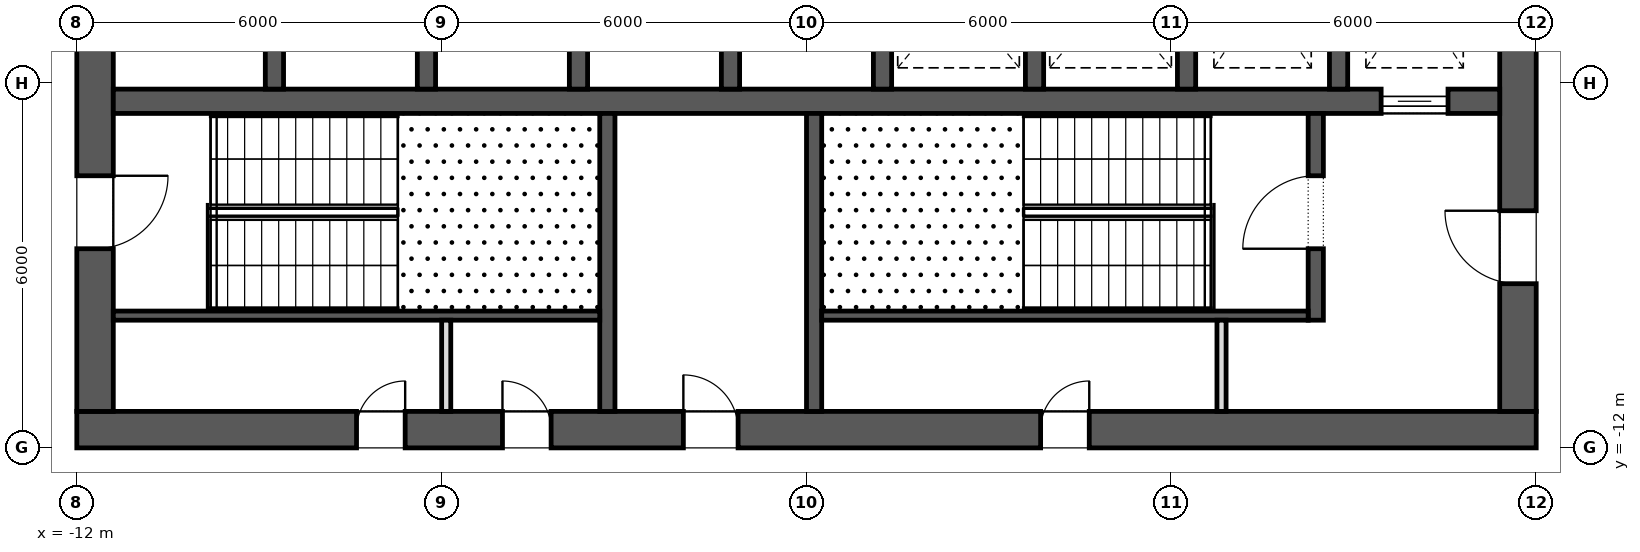
"""IFC4 building model, lengths in metres.
Left out: names, types, materials, properties, quantities, classifications, styles, units other than length and angle.
Written with IfcOpenShell. Run it as: python <this file> out.ifc"""

import sys

from ifc_helpers import new_model, si_unit, direction, frame, frame_2d, origin, place, context, subcontext, project, spatial, rectangle, extrude, element, fill, save


model = new_model("IFC4")
c1 = context("Model", 3, precision=1e-05, world=origin(), true_north=direction((0.0, 1.0)))
c2 = subcontext(c1, "Body", "Model", "MODEL_VIEW")
j1 = project(units=[si_unit("LENGTHUNIT", "METRE"), si_unit("PLANEANGLEUNIT", "RADIAN")], contexts=[c1])
p1 = place(None, origin())
s1 = spatial("IfcSite", under=j1, at=p1, CompositionType="ELEMENT")
p2 = place(p1, origin())
s2 = spatial("IfcBuilding", under=s1, at=p2, CompositionType="ELEMENT")
p3 = place(p2, frame((0.0, 0.0, 154.9)))
s3 = spatial("IfcBuildingStorey", under=s2, at=p3, CompositionType="ELEMENT", Elevation=154.9)
p4 = place(p3, frame((-12.0, -11.7, 0.0), z_axis=(0.0, 0.0, 1.0), x_axis=(1.0, 0.0, 0.0)))
e1 = element("IfcWall", 1, at=p4, inside=s3, PredefinedType="SHEAR", context=c2, shape_type="SweptSolid", body=[
    extrude(rectangle(XDim=24.0, YDim=0.6, at=frame_2d((12.0, 0.0))), origin(), (0.0, 0.0, 1.0), 4.2),
])
p5 = place(p4, frame((9.975, 0.0, 0.0)))
e2 = element("IfcOpeningElement", 2, at=p5, cuts=e1, PredefinedType="OPENING", context=c2, shape_type="SweptSolid", body=[
    extrude(rectangle(XDim=0.9, YDim=2.1, at=frame_2d((0.45, 1.05))), frame((0.0, 0.312, 0.0), z_axis=(0.0, -1.0, 0.0), x_axis=(1.0, 0.0, 0.0)), (0.0, 0.0, 1.0), 0.624),
])
p6 = place(p4, frame((4.6, 0.0, 0.0)))
e3 = element("IfcOpeningElement", 3, at=p6, cuts=e1, PredefinedType="OPENING", context=c2, shape_type="SweptSolid", body=[
    extrude(rectangle(XDim=0.8, YDim=2.1, at=frame_2d((0.4, 1.05))), frame((0.0, 0.312, 0.0), z_axis=(0.0, -1.0, 0.0), x_axis=(1.0, 0.0, 0.0)), (0.0, 0.0, 1.0), 0.624),
])
p7 = place(p4, frame((7.0, 0.0, 0.0)))
e4 = element("IfcOpeningElement", 4, at=p7, cuts=e1, PredefinedType="OPENING", context=c2, shape_type="SweptSolid", body=[
    extrude(rectangle(XDim=0.8, YDim=2.1, at=frame_2d((0.4, 1.05))), frame((0.0, 0.312, 0.0), z_axis=(0.0, -1.0, 0.0), x_axis=(1.0, 0.0, 0.0)), (0.0, 0.0, 1.0), 0.624),
])
p8 = place(p4, frame((15.85, 0.0, 0.0)))
e5 = element("IfcOpeningElement", 5, at=p8, cuts=e1, PredefinedType="OPENING", context=c2, shape_type="SweptSolid", body=[
    extrude(rectangle(XDim=0.8, YDim=2.1, at=frame_2d((0.4, 1.05))), frame((0.0, 0.312, 0.0), z_axis=(0.0, -1.0, 0.0), x_axis=(1.0, 0.0, 0.0)), (0.0, 0.0, 1.0), 0.624),
])
p9 = place(p3, frame((11.7, -11.4, 0.0), z_axis=(0.0, 0.0, 1.0), x_axis=(0.0, 1.0, 0.0)))
e6 = element("IfcWall", 6, at=p9, inside=s3, PredefinedType="SHEAR", context=c2, shape_type="SweptSolid", body=[
    extrude(rectangle(XDim=22.8, YDim=0.6, at=frame_2d((11.4, 0.0))), origin(), (0.0, 0.0, 1.0), 4.2),
])
p10 = place(p9, frame((10.2, 0.0, 0.0)))
e7 = element("IfcOpeningElement", 7, at=p10, cuts=e6, PredefinedType="OPENING", context=c2, shape_type="SweptSolid", body=[
    extrude(rectangle(XDim=2.4, YDim=2.1, at=frame_2d((1.2, 1.05))), frame((0.0, 0.312, 0.0), z_axis=(0.0, -1.0, 0.0), x_axis=(1.0, 0.0, 0.0)), (0.0, 0.0, 1.0), 0.624),
])
p11 = place(p9, frame((19.5, 0.0, 0.0)))
e8 = element("IfcOpeningElement", 8, at=p11, cuts=e6, PredefinedType="OPENING", context=c2, shape_type="SweptSolid", body=[
    extrude(rectangle(XDim=1.2, YDim=2.1, at=frame_2d((0.6, 1.05))), frame((0.0, 0.312, 0.0), z_axis=(0.0, -1.0, 0.0), x_axis=(1.0, 0.0, 0.0)), (0.0, 0.0, 1.0), 0.624),
])
p12 = place(p9, frame((2.1, 0.0, 0.0)))
e9 = element("IfcOpeningElement", 9, at=p12, cuts=e6, PredefinedType="OPENING", context=c2, shape_type="SweptSolid", body=[
    extrude(rectangle(XDim=1.2, YDim=2.1, at=frame_2d((0.6, 1.05))), frame((0.0, 0.312, 0.0), z_axis=(0.0, -1.0, 0.0), x_axis=(1.0, 0.0, 0.0)), (0.0, 0.0, 1.0), 0.624),
])
p13 = place(p3, frame((-11.7, -11.4, 0.0), z_axis=(0.0, 0.0, 1.0), x_axis=(0.0, 1.0, 0.0)))
e10 = element("IfcWall", 10, at=p13, inside=s3, PredefinedType="SHEAR", context=c2, shape_type="SweptSolid", body=[
    extrude(rectangle(XDim=22.8, YDim=0.6, at=frame_2d((11.4, 0.0))), origin(), (0.0, 0.0, 1.0), 4.2),
])
p14 = place(p13, frame((10.2, 0.0, 0.0)))
e11 = element("IfcOpeningElement", 11, at=p14, cuts=e10, PredefinedType="OPENING", context=c2, shape_type="SweptSolid", body=[
    extrude(rectangle(XDim=2.4, YDim=2.1, at=frame_2d((1.2, 1.05))), frame((0.0, 0.312, 0.0), z_axis=(0.0, -1.0, 0.0), x_axis=(1.0, 0.0, 0.0)), (0.0, 0.0, 1.0), 0.624),
])
p15 = place(p13, frame((18.925, 0.0, 0.0)))
e12 = element("IfcOpeningElement", 12, at=p15, cuts=e10, PredefinedType="OPENING", context=c2, shape_type="SweptSolid", body=[
    extrude(rectangle(XDim=1.2, YDim=2.1, at=frame_2d((0.6, 1.05))), frame((0.0, 0.312, 0.0), z_axis=(0.0, -1.0, 0.0), x_axis=(1.0, 0.0, 0.0)), (0.0, 0.0, 1.0), 0.624),
])
p16 = place(p13, frame((2.675, 0.0, 0.0)))
e13 = element("IfcOpeningElement", 13, at=p16, cuts=e10, PredefinedType="OPENING", context=c2, shape_type="SweptSolid", body=[
    extrude(rectangle(XDim=1.2, YDim=2.1, at=frame_2d((0.6, 1.05))), frame((0.0, 0.312, 0.0), z_axis=(0.0, -1.0, 0.0), x_axis=(1.0, 0.0, 0.0)), (0.0, 0.0, 1.0), 0.624),
])
p17 = place(p3, frame((-11.4, -6.3, 0.0), z_axis=(0.0, 0.0, 1.0), x_axis=(1.0, 0.0, 0.0)))
e14 = element("IfcWall", 14, at=p17, inside=s3, PredefinedType="SHEAR", context=c2, shape_type="SweptSolid", body=[
    extrude(rectangle(XDim=22.8, YDim=0.4, at=frame_2d((11.4, 0.0))), origin(), (0.0, 0.0, 1.0), 4.2),
])
p18 = place(p17, frame((20.85, 0.0, 0.0)))
e15 = element("IfcOpeningElement", 15, at=p18, cuts=e14, PredefinedType="OPENING", context=c2, shape_type="SweptSolid", body=[
    extrude(rectangle(XDim=1.1, YDim=2.1, at=frame_2d((0.55, 1.05))), frame((0.0, 0.212, 0.0), z_axis=(0.0, -1.0, 0.0), x_axis=(1.0, 0.0, 0.0)), (0.0, 0.0, 1.0), 0.424),
])
for number, where, z_axis, x_axis in (
    (16, (-8.75, -6.1, 0.0), (0.0, 0.0, 1.0), (0.0, 1.0, 0.0)),
    (17, (-6.25, -6.1, 0.0), (0.0, 0.0, 1.0), (0.0, 1.0, 0.0)),
    (18, (-3.75, -6.1, 0.0), (0.0, 0.0, 1.0), (0.0, 1.0, 0.0)),
    (19, (-1.25, -6.1, 0.0), (0.0, 0.0, 1.0), (0.0, 1.0, 0.0)),
    (20, (1.25, -6.1, 0.0), (0.0, 0.0, 1.0), (0.0, 1.0, 0.0)),
    (21, (3.75, -6.1, 0.0), (0.0, 0.0, 1.0), (0.0, 1.0, 0.0)),
    (22, (6.25, -6.1, 0.0), (0.0, 0.0, 1.0), (0.0, 1.0, 0.0)),
    (23, (8.75, -6.1, 0.0), (0.0, 0.0, 1.0), (0.0, 1.0, 0.0)),
):
    element("IfcWall", number, at=place(p3, frame(where, z_axis=z_axis, x_axis=x_axis)), inside=s3, PredefinedType="SHEAR", context=c2, shape_type="SweptSolid", body=[
        extrude(rectangle(XDim=2.9, YDim=0.3, at=frame_2d((1.45, 0.0))), origin(), (0.0, 0.0, 1.0), 4.2),
    ])
for number, where, z_axis, x_axis in (
    (24, (-3.275, -11.4, 0.0), (0.0, 0.0, 1.0), (0.0, 1.0, 0.0)),
    (25, (0.125, -11.4, 0.0), (0.0, 0.0, 1.0), (0.0, 1.0, 0.0)),
):
    element("IfcWall", number, at=place(p3, frame(where, z_axis=z_axis, x_axis=x_axis)), inside=s3, PredefinedType="SHEAR", context=c2, shape_type="SweptSolid", body=[
        extrude(rectangle(XDim=4.9, YDim=0.25, at=frame_2d((2.45, 0.0))), origin(), (0.0, 0.0, 1.0), 3.9),
    ])
p19 = place(p3, frame((8.375, -9.9, 0.0), z_axis=(0.0, 0.0, 1.0), x_axis=(0.0, 1.0, 0.0)))
e26 = element("IfcWall", 26, at=p19, inside=s3, PredefinedType="SHEAR", context=c2, shape_type="SweptSolid", body=[
    extrude(rectangle(XDim=3.4, YDim=0.25, at=frame_2d((1.7, 0.0))), origin(), (0.0, 0.0, 1.0), 3.9),
])
p20 = place(p19, frame((1.175, 0.0, 0.0)))
e27 = element("IfcOpeningElement", 27, at=p20, cuts=e26, PredefinedType="OPENING", context=c2, shape_type="SweptSolid", body=[
    extrude(rectangle(XDim=1.2, YDim=2.1, at=frame_2d((0.6, 1.05))), frame((0.0, 0.137, 0.0), z_axis=(0.0, -1.0, 0.0), x_axis=(1.0, 0.0, 0.0)), (0.0, 0.0, 1.0), 0.274),
])
for number, where, z_axis, x_axis in (
    (28, (-11.4, -9.825, 0.0), (0.0, 0.0, 1.0), (1.0, 0.0, 0.0)),
    (29, (0.25, -9.825, 0.0), (0.0, 0.0, 1.0), (1.0, 0.0, 0.0)),
):
    element("IfcWall", number, at=place(p3, frame(where, z_axis=z_axis, x_axis=x_axis)), inside=s3, PredefinedType="SHEAR", context=c2, shape_type="SweptSolid", body=[
        extrude(rectangle(XDim=8.0, YDim=0.15, at=frame_2d((4.0, 0.0))), origin(), (0.0, 0.0, 1.0), 3.9),
    ])
for number, where, z_axis, x_axis in (
    (30, (-5.925, -11.4, 0.0), (0.0, 0.0, 1.0), (0.0, 1.0, 0.0)),
    (31, (6.825, -11.4, 0.0), (0.0, 0.0, 1.0), (0.0, 1.0, 0.0)),
):
    element("IfcWall", number, at=place(p3, frame(where, z_axis=z_axis, x_axis=x_axis)), inside=s3, PredefinedType="PARTITIONING", context=c2, shape_type="SweptSolid", body=[
        extrude(rectangle(XDim=1.5, YDim=0.15, at=frame_2d((0.75, 0.0))), origin(), (0.0, 0.0, 1.0), 3.9),
    ])
p21 = place(p18, origin())
e32 = element("IfcDoor", 32, at=p21, inside=s3, OperationType="SLIDING_TO_LEFT", PredefinedType="DOOR", context=c2, shape_type="SweptSolid", body=[
    extrude(rectangle(XDim=1.1, YDim=2.1, at=frame_2d((0.55, 1.05))), frame((0.0, 0.025, 0.0), z_axis=(0.0, -1.0, 0.0), x_axis=(1.0, 0.0, 0.0)), (0.0, 0.0, 1.0), 0.05),
])
fill(e15, e32)
p22 = place(p16, frame((1.2, 0.0, 0.0), z_axis=(0.0, 0.0, 1.0), x_axis=(-1.0, 0.0, 0.0)))
e33 = element("IfcDoor", 33, at=p22, inside=s3, OperationType="SINGLE_SWING_RIGHT", PredefinedType="DOOR", context=c2, shape_type="SweptSolid", body=[
    extrude(rectangle(XDim=1.2, YDim=2.1, at=frame_2d((0.6, 1.05))), frame((0.0, 0.025, 0.0), z_axis=(0.0, -1.0, 0.0), x_axis=(1.0, 0.0, 0.0)), (0.0, 0.0, 1.0), 0.05),
])
fill(e13, e33)
p23 = place(p20, origin())
e34 = element("IfcDoor", 34, at=p23, inside=s3, OperationType="SINGLE_SWING_RIGHT", PredefinedType="DOOR", context=c2, shape_type="SweptSolid", body=[
    extrude(rectangle(XDim=1.2, YDim=2.1, at=frame_2d((0.6, 1.05))), frame((0.0, 0.025, 0.0), z_axis=(0.0, -1.0, 0.0), x_axis=(1.0, 0.0, 0.0)), (0.0, 0.0, 1.0), 0.05),
])
fill(e27, e34)
p24 = place(p12, origin())
e35 = element("IfcDoor", 35, at=p24, inside=s3, OperationType="SINGLE_SWING_LEFT", PredefinedType="DOOR", context=c2, shape_type="SweptSolid", body=[
    extrude(rectangle(XDim=1.2, YDim=2.1, at=frame_2d((0.6, 1.05))), frame((0.0, 0.025, 0.0), z_axis=(0.0, -1.0, 0.0), x_axis=(1.0, 0.0, 0.0)), (0.0, 0.0, 1.0), 0.05),
])
fill(e9, e35)
p25 = place(p5, origin())
e36 = element("IfcDoor", 36, at=p25, inside=s3, OperationType="SINGLE_SWING_RIGHT", PredefinedType="DOOR", context=c2, shape_type="SweptSolid", body=[
    extrude(rectangle(XDim=0.9, YDim=2.1, at=frame_2d((0.45, 1.05))), frame((0.0, 0.025, 0.0), z_axis=(0.0, -1.0, 0.0), x_axis=(1.0, 0.0, 0.0)), (0.0, 0.0, 1.0), 0.05),
])
fill(e2, e36)
p26 = place(p6, origin())
e37 = element("IfcDoor", 37, at=p26, inside=s3, OperationType="SINGLE_SWING_LEFT", PredefinedType="DOOR", context=c2, shape_type="SweptSolid", body=[
    extrude(rectangle(XDim=0.8, YDim=2.1, at=frame_2d((0.4, 1.05))), frame((0.0, 0.025, 0.0), z_axis=(0.0, -1.0, 0.0), x_axis=(1.0, 0.0, 0.0)), (0.0, 0.0, 1.0), 0.05),
])
fill(e3, e37)
p27 = place(p7, origin())
e38 = element("IfcDoor", 38, at=p27, inside=s3, OperationType="SINGLE_SWING_RIGHT", PredefinedType="DOOR", context=c2, shape_type="SweptSolid", body=[
    extrude(rectangle(XDim=0.8, YDim=2.1, at=frame_2d((0.4, 1.05))), frame((0.0, 0.025, 0.0), z_axis=(0.0, -1.0, 0.0), x_axis=(1.0, 0.0, 0.0)), (0.0, 0.0, 1.0), 0.05),
])
fill(e4, e38)
p28 = place(p8, origin())
e39 = element("IfcDoor", 39, at=p28, inside=s3, OperationType="SINGLE_SWING_LEFT", PredefinedType="DOOR", context=c2, shape_type="SweptSolid", body=[
    extrude(rectangle(XDim=0.8, YDim=2.1, at=frame_2d((0.4, 1.05))), frame((0.0, 0.025, 0.0), z_axis=(0.0, -1.0, 0.0), x_axis=(1.0, 0.0, 0.0)), (0.0, 0.0, 1.0), 0.05),
])
fill(e5, e39)
save(model, sys.argv[1])
